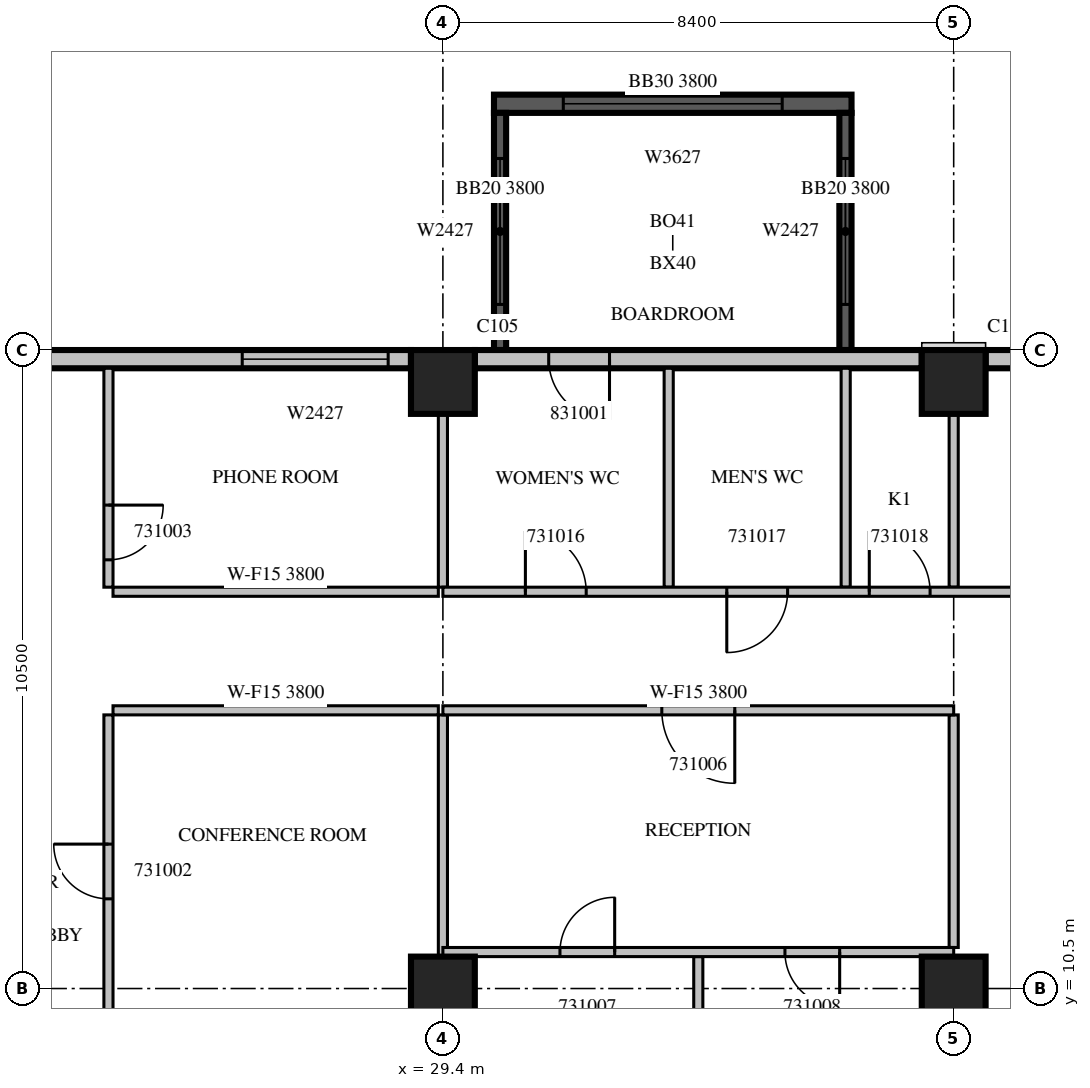
"""IFC4 building model, lengths in metres.
Left out: names, types, materials, properties, quantities, classifications, styles, units other than length and angle.
Written with IfcOpenShell. Run it as: python <this file> out.ifc"""

import sys

from ifc_helpers import new_model, si_unit, direction, frame, frame_2d, origin, origin_2d, place, context, subcontext, project, spatial, rectangle, extrude, source, transform, mapped, element, fill, save


model = new_model("IFC4")
c1 = context("Model", 3, precision=1e-05, world=origin(), true_north=direction((0.0, 1.0)))
c2 = subcontext(c1, "Body", "Model", "MODEL_VIEW")
j1 = project(units=[si_unit("LENGTHUNIT", "METRE"), si_unit("PLANEANGLEUNIT", "RADIAN")], contexts=[c1])
p1 = place(None, origin())
s1 = spatial("IfcSite", under=j1, at=p1, CompositionType="ELEMENT")
p2 = place(p1, origin())
s2 = spatial("IfcBuilding", under=s1, at=p2, CompositionType="ELEMENT")
p3 = place(p2, frame((0.0, 0.0, 141.3)))
s3 = spatial("IfcBuildingStorey", under=s2, at=p3, CompositionType="ELEMENT", Elevation=141.3)
m1 = source(origin(), c2, "Body", "SweptSolid", [
    extrude(rectangle(XDim=1.05, YDim=1.05, at=origin_2d()), origin(), (0.0, 0.0, 1.0), 4.2),
])
for number, where, z_axis, x_axis in (
    (1, (29.4, 10.5, 0.0), (0.0, 0.0, 1.0), (1.0, 0.0, 0.0)),
    (2, (37.8, 10.5, 0.0), (0.0, 0.0, 1.0), (1.0, 0.0, 0.0)),
    (3, (29.4, 20.475, 0.0), (0.0, 0.0, 1.0), (1.0, 0.0, 0.0)),
    (4, (37.8, 20.475, 0.0), (0.0, 0.0, 1.0), (1.0, 0.0, 0.0)),
):
    element("IfcColumn", number, at=place(p3, frame(where, z_axis=z_axis, x_axis=x_axis)), inside=s3, PredefinedType="COLUMN", context=c2, shape_type="MappedRepresentation", body=[
        mapped(m1, transform((0.0, 0.0, 0.0), scale=1.0)),
    ])
m2 = source(origin(), c2, "Body", "SweptSolid", [
    extrude(rectangle(XDim=5.88, YDim=0.3, at=frame_2d((2.94, 0.0))), origin(), (0.0, 0.0, 1.0), 3.8),
])
p4 = place(p3, frame((36.12, 25.05, 0.0), z_axis=(0.0, 0.0, 1.0), x_axis=(-1.0, 0.0, 0.0)))
e5 = element("IfcWall", 5, at=p4, inside=s3, PredefinedType="SOLIDWALL", context=c2, shape_type="MappedRepresentation", body=[
    mapped(m2, transform((0.0, 0.0, 0.0), scale=1.0)),
])
m3 = source(origin(), c2, "Body", "SweptSolid", [
    extrude(rectangle(XDim=3.6, YDim=2.7, at=frame_2d((1.8, 1.35))), frame((0.0, 0.16, 0.0), z_axis=(0.0, -1.0, 0.0), x_axis=(1.0, 0.0, 0.0)), (0.0, 0.0, 1.0), 0.32),
])
p5 = place(p4, frame((1.14, 0.0, 0.6)))
e6 = element("IfcOpeningElement", 6, at=p5, cuts=e5, PredefinedType="OPENING", context=c2, shape_type="MappedRepresentation", body=[
    mapped(m3, transform((0.0, 0.0, 0.0), scale=1.0)),
])
m4 = source(origin(), c2, "Body", "SweptSolid", [
    extrude(rectangle(XDim=3.9, YDim=0.2, at=frame_2d((1.95, 0.0))), origin(), (0.0, 0.0, 1.0), 3.8),
])
p6 = place(p3, frame((36.02, 21.0, 0.0), z_axis=(0.0, 0.0, 1.0), x_axis=(0.0, 1.0, 0.0)))
e7 = element("IfcWall", 7, at=p6, inside=s3, PredefinedType="SOLIDWALL", context=c2, shape_type="MappedRepresentation", body=[
    mapped(m4, transform((0.0, 0.0, 0.0), scale=1.0)),
])
m5 = source(origin(), c2, "Body", "SweptSolid", [
    extrude(rectangle(XDim=2.4, YDim=2.7, at=frame_2d((1.2, 1.35))), frame((0.0, 0.11, 0.0), z_axis=(0.0, -1.0, 0.0), x_axis=(1.0, 0.0, 0.0)), (0.0, 0.0, 1.0), 0.22),
])
p7 = place(p6, frame((0.75, 0.0, 0.6)))
e8 = element("IfcOpeningElement", 8, at=p7, cuts=e7, PredefinedType="OPENING", context=c2, shape_type="MappedRepresentation", body=[
    mapped(m5, transform((0.0, 0.0, 0.0), scale=1.0)),
])
p8 = place(p3, frame((30.34, 21.0, 0.0), z_axis=(0.0, 0.0, 1.0), x_axis=(0.0, 1.0, 0.0)))
e9 = element("IfcWall", 9, at=p8, inside=s3, PredefinedType="SOLIDWALL", context=c2, shape_type="MappedRepresentation", body=[
    mapped(m4, transform((0.0, 0.0, 0.0), scale=1.0)),
])
p9 = place(p8, frame((0.75, 0.0, 0.6)))
e10 = element("IfcOpeningElement", 10, at=p9, cuts=e9, PredefinedType="OPENING", context=c2, shape_type="MappedRepresentation", body=[
    mapped(m5, transform((0.0, 0.0, 0.0), scale=1.0)),
])
m6 = source(origin(), c2, "Body", "SweptSolid", [
    extrude(rectangle(XDim=7.35, YDim=0.3, at=frame_2d((3.675, 0.0))), origin(), (0.0, 0.0, 1.0), 3.8),
])
p10 = place(p3, frame((45.675, 20.85, 0.0), z_axis=(0.0, 0.0, 1.0), x_axis=(-1.0, 0.0, 0.0)))
e11 = element("IfcWall", 11, at=p10, inside=s3, PredefinedType="STANDARD", context=c2, shape_type="MappedRepresentation", body=[
    mapped(m6, transform((0.0, 0.0, 0.0), scale=1.0)),
])
m7 = source(origin(), c2, "Body", "SweptSolid", [
    extrude(rectangle(XDim=1.0, YDim=2.1, at=frame_2d((0.5, 1.05))), frame((0.0, 0.16, 0.0), z_axis=(0.0, -1.0, 0.0), x_axis=(1.0, 0.0, 0.0)), (0.0, 0.0, 1.0), 0.32),
])
p11 = place(p10, frame((1.075, 0.0, 0.0)))
e12 = element("IfcOpeningElement", 12, at=p11, cuts=e11, PredefinedType="OPENING", context=c2, shape_type="MappedRepresentation", body=[
    mapped(m7, transform((0.0, 0.0, 0.0), scale=1.0)),
])
p12 = place(p3, frame((37.275, 20.85, 0.0), z_axis=(0.0, 0.0, 1.0), x_axis=(-1.0, 0.0, 0.0)))
e13 = element("IfcWall", 13, at=p12, inside=s3, PredefinedType="STANDARD", context=c2, shape_type="MappedRepresentation", body=[
    mapped(m6, transform((0.0, 0.0, 0.0), scale=1.0)),
])
p13 = place(p12, frame((5.135, 0.0, 0.0)))
e14 = element("IfcOpeningElement", 14, at=p13, cuts=e13, PredefinedType="OPENING", context=c2, shape_type="MappedRepresentation", body=[
    mapped(m7, transform((0.0, 0.0, 0.0), scale=1.0)),
])
m8 = source(origin(), c2, "Body", "SweptSolid", [
    extrude(rectangle(XDim=6.875, YDim=0.3, at=frame_2d((3.438, 0.0))), origin(), (0.0, 0.0, 1.0), 3.8),
])
p14 = place(p3, frame((28.875, 20.85, 0.0), z_axis=(0.0, 0.0, 1.0), x_axis=(-1.0, 0.0, 0.0)))
e15 = element("IfcWall", 15, at=p14, inside=s3, PredefinedType="STANDARD", context=c2, shape_type="MappedRepresentation", body=[
    mapped(m8, transform((0.0, 0.0, 0.0), scale=1.0)),
])
m9 = source(origin(), c2, "Body", "SweptSolid", [
    extrude(rectangle(XDim=2.4, YDim=2.7, at=frame_2d((1.2, 1.35))), frame((0.0, 0.16, 0.0), z_axis=(0.0, -1.0, 0.0), x_axis=(1.0, 0.0, 0.0)), (0.0, 0.0, 1.0), 0.32),
])
p15 = place(p14, frame((0.375, 0.0, 0.6)))
e16 = element("IfcOpeningElement", 16, at=p15, cuts=e15, PredefinedType="OPENING", context=c2, shape_type="MappedRepresentation", body=[
    mapped(m9, transform((0.0, 0.0, 0.0), scale=1.0)),
])
m10 = source(origin(), c2, "Body", "SweptSolid", [
    extrude(rectangle(XDim=11.725, YDim=0.15, at=frame_2d((5.862, 0.0))), origin(), (0.0, 0.0, 1.0), 3.8),
])
p16 = place(p3, frame((23.9, 15.0, 0.0), z_axis=(0.0, 0.0, 1.0), x_axis=(0.0, -1.0, 0.0)))
e17 = element("IfcWall", 17, at=p16, inside=s3, PredefinedType="PARTITIONING", context=c2, shape_type="MappedRepresentation", body=[
    mapped(m10, transform((0.0, 0.0, 0.0), scale=1.0)),
])
m11 = source(origin(), c2, "Body", "SweptSolid", [
    extrude(rectangle(XDim=0.9, YDim=2.1, at=frame_2d((0.45, 1.05))), frame((0.0, 0.085, 0.0), z_axis=(0.0, -1.0, 0.0), x_axis=(1.0, 0.0, 0.0)), (0.0, 0.0, 1.0), 0.17),
])
p17 = place(p16, frame((8.863, 0.0, 0.0)))
e18 = element("IfcOpeningElement", 18, at=p17, cuts=e17, PredefinedType="OPENING", context=c2, shape_type="MappedRepresentation", body=[
    mapped(m11, transform((0.0, 0.0, 0.0), scale=1.0)),
])
p18 = place(p16, frame((2.125, 0.0, 0.0)))
e19 = element("IfcOpeningElement", 19, at=p18, cuts=e17, PredefinedType="OPENING", context=c2, shape_type="MappedRepresentation", body=[
    mapped(m11, transform((0.0, 0.0, 0.0), scale=1.0)),
])
m12 = source(origin(), c2, "Body", "SweptSolid", [
    extrude(rectangle(XDim=3.6, YDim=0.15, at=frame_2d((1.8, 0.0))), origin(), (0.0, 0.0, 1.0), 3.8),
])
p19 = place(p3, frame((23.9, 20.7, 0.0), z_axis=(0.0, 0.0, 1.0), x_axis=(0.0, -1.0, 0.0)))
e20 = element("IfcWall", 20, at=p19, inside=s3, PredefinedType="PARTITIONING", context=c2, shape_type="MappedRepresentation", body=[
    mapped(m12, transform((0.0, 0.0, 0.0), scale=1.0)),
])
p20 = place(p19, frame((2.25, 0.0, 0.0)))
e21 = element("IfcOpeningElement", 21, at=p20, cuts=e20, PredefinedType="OPENING", context=c2, shape_type="MappedRepresentation", body=[
    mapped(m11, transform((0.0, 0.0, 0.0), scale=1.0)),
])
m13 = source(origin(), c2, "Body", "SweptSolid", [
    extrude(rectangle(XDim=5.35, YDim=0.15, at=frame_2d((2.675, 0.0))), origin(), (0.0, 0.0, 1.0), 3.8),
])
for number, where, z_axis, x_axis in (
    (22, (29.325, 15.075, 0.0), (0.0, 0.0, 1.0), (-1.0, 0.0, 0.0)),
    (23, (23.975, 17.025, 0.0), (0.0, 0.0, 1.0), (1.0, 0.0, 0.0)),
):
    element("IfcWall", number, at=place(p3, frame(where, z_axis=z_axis, x_axis=x_axis)), inside=s3, PredefinedType="PARTITIONING", context=c2, shape_type="MappedRepresentation", body=[
        mapped(m13, transform((0.0, 0.0, 0.0), scale=1.0)),
    ])
m14 = source(origin(), c2, "Body", "SweptSolid", [
    extrude(rectangle(XDim=3.976, YDim=0.15, at=frame_2d((1.988, 0.0))), origin(), (0.0, 0.0, 1.0), 3.8),
])
p21 = place(p3, frame((29.4, 11.024, 0.0), z_axis=(0.0, 0.0, 1.0), x_axis=(0.0, 1.0, 0.0)))
e24 = element("IfcWall", 24, at=p21, inside=s3, PredefinedType="PARTITIONING", context=c2, shape_type="MappedRepresentation", body=[
    mapped(m14, transform((0.0, 0.0, 0.0), scale=1.0)),
])
m15 = source(origin(), c2, "Body", "SweptSolid", [
    extrude(rectangle(XDim=2.851, YDim=0.15, at=frame_2d((1.425, 0.0))), origin(), (0.0, 0.0, 1.0), 3.8),
])
p22 = place(p3, frame((29.4, 17.1, 0.0), z_axis=(0.0, 0.0, 1.0), x_axis=(0.0, 1.0, 0.0)))
e25 = element("IfcWall", 25, at=p22, inside=s3, PredefinedType="PARTITIONING", context=c2, shape_type="MappedRepresentation", body=[
    mapped(m15, transform((0.0, 0.0, 0.0), scale=1.0)),
])
m16 = source(origin(), c2, "Body", "SweptSolid", [
    extrude(rectangle(XDim=10.725, YDim=0.15, at=frame_2d((5.362, 0.0))), origin(), (0.0, 0.0, 1.0), 3.8),
])
p23 = place(p3, frame((33.6, 0.3, 0.0), z_axis=(0.0, 0.0, 1.0), x_axis=(0.0, 1.0, 0.0)))
e26 = element("IfcWall", 26, at=p23, inside=s3, PredefinedType="PARTITIONING", context=c2, shape_type="MappedRepresentation", body=[
    mapped(m16, transform((0.0, 0.0, 0.0), scale=1.0)),
])
m17 = source(origin(), c2, "Body", "SweptSolid", [
    extrude(rectangle(XDim=3.825, YDim=0.15, at=frame_2d((1.913, 0.0))), origin(), (0.0, 0.0, 1.0), 3.8),
])
p24 = place(p3, frame((37.8, 11.175, 0.0), z_axis=(0.0, 0.0, 1.0), x_axis=(0.0, 1.0, 0.0)))
e27 = element("IfcWall", 27, at=p24, inside=s3, PredefinedType="PARTITIONING", context=c2, shape_type="MappedRepresentation", body=[
    mapped(m17, transform((0.0, 0.0, 0.0), scale=1.0)),
])
m18 = source(origin(), c2, "Body", "SweptSolid", [
    extrude(rectangle(XDim=8.4, YDim=0.15, at=frame_2d((4.2, 0.0))), origin(), (0.0, 0.0, 1.0), 3.8),
])
p25 = place(p3, frame((37.8, 11.1, 0.0), z_axis=(0.0, 0.0, 1.0), x_axis=(-1.0, 0.0, 0.0)))
e28 = element("IfcWall", 28, at=p25, inside=s3, PredefinedType="PARTITIONING", context=c2, shape_type="MappedRepresentation", body=[
    mapped(m18, transform((0.0, 0.0, 0.0), scale=1.0)),
])
p26 = place(p25, frame((5.575, 0.0, 0.0)))
e29 = element("IfcOpeningElement", 29, at=p26, cuts=e28, PredefinedType="OPENING", context=c2, shape_type="MappedRepresentation", body=[
    mapped(m11, transform((0.0, 0.0, 0.0), scale=1.0)),
])
p27 = place(p25, frame((1.875, 0.0, 0.0)))
e30 = element("IfcOpeningElement", 30, at=p27, cuts=e28, PredefinedType="OPENING", context=c2, shape_type="MappedRepresentation", body=[
    mapped(m11, transform((0.0, 0.0, 0.0), scale=1.0)),
])
for number, where, z_axis, x_axis in (
    (31, (33.113, 20.7, 0.0), (0.0, 0.0, 1.0), (0.0, -1.0, 0.0)),
    (32, (36.024, 20.7, 0.0), (0.0, 0.0, 1.0), (0.0, -1.0, 0.0)),
):
    element("IfcWall", number, at=place(p3, frame(where, z_axis=z_axis, x_axis=x_axis)), inside=s3, PredefinedType="PARTITIONING", context=c2, shape_type="MappedRepresentation", body=[
        mapped(m12, transform((0.0, 0.0, 0.0), scale=1.0)),
    ])
p28 = place(p3, frame((37.8, 17.1, 0.0), z_axis=(0.0, 0.0, 1.0), x_axis=(0.0, 1.0, 0.0)))
e33 = element("IfcWall", 33, at=p28, inside=s3, PredefinedType="PARTITIONING", context=c2, shape_type="MappedRepresentation", body=[
    mapped(m15, transform((0.0, 0.0, 0.0), scale=1.0)),
])
p29 = place(p3, frame((37.8, 15.075, 0.0), z_axis=(0.0, 0.0, 1.0), x_axis=(-1.0, 0.0, 0.0)))
e34 = element("IfcWall", 34, at=p29, inside=s3, PredefinedType="PARTITIONING", context=c2, shape_type="MappedRepresentation", body=[
    mapped(m18, transform((0.0, 0.0, 0.0), scale=1.0)),
])
m19 = source(origin(), c2, "Body", "SweptSolid", [
    extrude(rectangle(XDim=1.2, YDim=2.1, at=frame_2d((0.6, 1.05))), frame((0.0, 0.085, 0.0), z_axis=(0.0, -1.0, 0.0), x_axis=(1.0, 0.0, 0.0)), (0.0, 0.0, 1.0), 0.17),
])
p30 = place(p29, frame((3.6, 0.0, 0.0)))
e35 = element("IfcOpeningElement", 35, at=p30, cuts=e34, PredefinedType="OPENING", context=c2, shape_type="MappedRepresentation", body=[
    mapped(m19, transform((0.0, 0.0, 0.0), scale=1.0)),
])
m20 = source(origin(), c2, "Body", "SweptSolid", [
    extrude(rectangle(XDim=37.5, YDim=0.15, at=frame_2d((18.75, 0.0))), origin(), (0.0, 0.0, 1.0), 3.8),
])
p31 = place(p3, frame((29.4, 17.025, 0.0), z_axis=(0.0, 0.0, 1.0), x_axis=(1.0, 0.0, 0.0)))
e36 = element("IfcWall", 36, at=p31, inside=s3, PredefinedType="PARTITIONING", context=c2, shape_type="MappedRepresentation", body=[
    mapped(m20, transform((0.0, 0.0, 0.0), scale=1.0)),
])
m21 = source(origin(), c2, "Body", "SweptSolid", [
    extrude(rectangle(XDim=1.0, YDim=2.1, at=frame_2d((0.5, 1.05))), frame((0.0, 0.085, 0.0), z_axis=(0.0, -1.0, 0.0), x_axis=(1.0, 0.0, 0.0)), (0.0, 0.0, 1.0), 0.17),
])
p32 = place(p31, frame((1.357, 0.0, 0.0)))
e37 = element("IfcOpeningElement", 37, at=p32, cuts=e36, PredefinedType="OPENING", context=c2, shape_type="MappedRepresentation", body=[
    mapped(m21, transform((0.0, 0.0, 0.0), scale=1.0)),
])
p33 = place(p31, frame((4.669, 0.0, 0.0)))
e38 = element("IfcOpeningElement", 38, at=p33, cuts=e36, PredefinedType="OPENING", context=c2, shape_type="MappedRepresentation", body=[
    mapped(m21, transform((0.0, 0.0, 0.0), scale=1.0)),
])
p34 = place(p31, frame((7.012, 0.0, 0.0)))
e39 = element("IfcOpeningElement", 39, at=p34, cuts=e36, PredefinedType="OPENING", context=c2, shape_type="MappedRepresentation", body=[
    mapped(m21, transform((0.0, 0.0, 0.0), scale=1.0)),
])
p35 = place(p31, frame((12.0, 0.0, 0.0)))
e40 = element("IfcOpeningElement", 40, at=p35, cuts=e36, PredefinedType="OPENING", context=c2, shape_type="MappedRepresentation", body=[
    mapped(m19, transform((0.0, 0.0, 0.0), scale=1.0)),
])
p36 = place(p31, frame((19.29, 0.0, 0.0)))
e41 = element("IfcOpeningElement", 41, at=p36, cuts=e36, PredefinedType="OPENING", context=c2, shape_type="MappedRepresentation", body=[
    mapped(m11, transform((0.0, 0.0, 0.0), scale=1.0)),
])
p37 = place(p31, frame((25.17, 0.0, 0.0)))
e42 = element("IfcOpeningElement", 42, at=p37, cuts=e36, PredefinedType="OPENING", context=c2, shape_type="MappedRepresentation", body=[
    mapped(m11, transform((0.0, 0.0, 0.0), scale=1.0)),
])
p38 = place(p31, frame((30.214, 0.0, 0.0)))
e43 = element("IfcOpeningElement", 43, at=p38, cuts=e36, PredefinedType="OPENING", context=c2, shape_type="MappedRepresentation", body=[
    mapped(m19, transform((0.0, 0.0, 0.0), scale=1.0)),
])
p39 = place(p31, frame((34.721, 0.0, 0.0)))
e44 = element("IfcOpeningElement", 44, at=p39, cuts=e36, PredefinedType="OPENING", context=c2, shape_type="MappedRepresentation", body=[
    mapped(m19, transform((0.0, 0.0, 0.0), scale=1.0)),
])
m22 = source(origin(), c2, "Body", "SweptSolid", [
    extrude(rectangle(XDim=3.6, YDim=2.7, at=frame_2d((1.8, 1.35))), frame((0.0, 0.03, 0.0), z_axis=(0.0, -1.0, 0.0), x_axis=(1.0, 0.0, 0.0)), (0.0, 0.0, 1.0), 0.06),
])
p40 = place(p5, origin())
e45 = element("IfcWindow", 45, at=p40, inside=s3, PartitioningType="SINGLE_PANEL", PredefinedType="WINDOW", context=c2, shape_type="MappedRepresentation", body=[
    mapped(m22, transform((0.0, 0.0, 0.0), scale=1.0)),
])
fill(e6, e45)
m23 = source(origin(), c2, "Body", "SweptSolid", [
    extrude(rectangle(XDim=2.4, YDim=2.7, at=frame_2d((1.2, 1.35))), frame((0.0, 0.03, 0.0), z_axis=(0.0, -1.0, 0.0), x_axis=(1.0, 0.0, 0.0)), (0.0, 0.0, 1.0), 0.06),
])
p41 = place(p7, origin())
e46 = element("IfcWindow", 46, at=p41, inside=s3, PartitioningType="SINGLE_PANEL", PredefinedType="WINDOW", context=c2, shape_type="MappedRepresentation", body=[
    mapped(m23, transform((0.0, 0.0, 0.0), scale=1.0)),
])
fill(e8, e46)
p42 = place(p9, origin())
e47 = element("IfcWindow", 47, at=p42, inside=s3, PartitioningType="SINGLE_PANEL", PredefinedType="WINDOW", context=c2, shape_type="MappedRepresentation", body=[
    mapped(m23, transform((0.0, 0.0, 0.0), scale=1.0)),
])
fill(e10, e47)
p43 = place(p15, origin())
e48 = element("IfcWindow", 48, at=p43, inside=s3, PartitioningType="SINGLE_PANEL", PredefinedType="WINDOW", context=c2, shape_type="MappedRepresentation", body=[
    mapped(m23, transform((0.0, 0.0, 0.0), scale=1.0)),
])
fill(e16, e48)
m24 = source(origin(), c2, "Body", "SweptSolid", [
    extrude(rectangle(XDim=0.9, YDim=2.1, at=frame_2d((0.45, 1.05))), frame((0.0, 0.025, 0.0), z_axis=(0.0, -1.0, 0.0), x_axis=(1.0, 0.0, 0.0)), (0.0, 0.0, 1.0), 0.05),
])
p44 = place(p18, origin())
e49 = element("IfcDoor", 49, at=p44, inside=s3, OperationType="SINGLE_SWING_RIGHT", PredefinedType="DOOR", context=c2, shape_type="MappedRepresentation", body=[
    mapped(m24, transform((0.0, 0.0, 0.0), scale=1.0)),
])
fill(e19, e49)
p45 = place(p20, origin())
e50 = element("IfcDoor", 50, at=p45, inside=s3, OperationType="SINGLE_SWING_LEFT", PredefinedType="DOOR", context=c2, shape_type="MappedRepresentation", body=[
    mapped(m24, transform((0.0, 0.0, 0.0), scale=1.0)),
])
fill(e21, e50)
m25 = source(origin(), c2, "Body", "SweptSolid", [
    extrude(rectangle(XDim=1.2, YDim=2.1, at=frame_2d((0.6, 1.05))), frame((0.0, 0.025, 0.0), z_axis=(0.0, -1.0, 0.0), x_axis=(1.0, 0.0, 0.0)), (0.0, 0.0, 1.0), 0.05),
])
p46 = place(p30, origin())
e51 = element("IfcDoor", 51, at=p46, inside=s3, OperationType="SINGLE_SWING_LEFT", PredefinedType="DOOR", context=c2, shape_type="MappedRepresentation", body=[
    mapped(m25, transform((0.0, 0.0, 0.0), scale=1.0)),
])
fill(e35, e51)
p47 = place(p26, origin())
e52 = element("IfcDoor", 52, at=p47, inside=s3, OperationType="SINGLE_SWING_RIGHT", PredefinedType="DOOR", context=c2, shape_type="MappedRepresentation", body=[
    mapped(m24, transform((0.0, 0.0, 0.0), scale=1.0)),
])
fill(e29, e52)
p48 = place(p27, origin())
e53 = element("IfcDoor", 53, at=p48, inside=s3, OperationType="SINGLE_SWING_LEFT", PredefinedType="DOOR", context=c2, shape_type="MappedRepresentation", body=[
    mapped(m24, transform((0.0, 0.0, 0.0), scale=1.0)),
])
fill(e30, e53)
m26 = source(origin(), c2, "Body", "SweptSolid", [
    extrude(rectangle(XDim=1.0, YDim=2.1, at=frame_2d((0.5, 1.05))), frame((0.0, 0.025, 0.0), z_axis=(0.0, -1.0, 0.0), x_axis=(1.0, 0.0, 0.0)), (0.0, 0.0, 1.0), 0.05),
])
p49 = place(p32, origin())
e54 = element("IfcDoor", 54, at=p49, inside=s3, OperationType="SINGLE_SWING_LEFT", PredefinedType="DOOR", context=c2, shape_type="MappedRepresentation", body=[
    mapped(m26, transform((0.0, 0.0, 0.0), scale=1.0)),
])
fill(e37, e54)
p50 = place(p33, origin())
e55 = element("IfcDoor", 55, at=p50, inside=s3, OperationType="SINGLE_SWING_RIGHT", PredefinedType="DOOR", context=c2, shape_type="MappedRepresentation", body=[
    mapped(m26, transform((0.0, 0.0, 0.0), scale=1.0)),
])
fill(e38, e55)
p51 = place(p34, origin())
e56 = element("IfcDoor", 56, at=p51, inside=s3, OperationType="SINGLE_SWING_LEFT", PredefinedType="DOOR", context=c2, shape_type="MappedRepresentation", body=[
    mapped(m26, transform((0.0, 0.0, 0.0), scale=1.0)),
])
fill(e39, e56)
p52 = place(p13, origin())
e57 = element("IfcDoor", 57, at=p52, inside=s3, OperationType="SINGLE_SWING_LEFT", PredefinedType="DOOR", context=c2, shape_type="MappedRepresentation", body=[
    mapped(m26, transform((0.0, 0.0, 0.0), scale=1.0)),
])
fill(e14, e57)
save(model, sys.argv[1])
